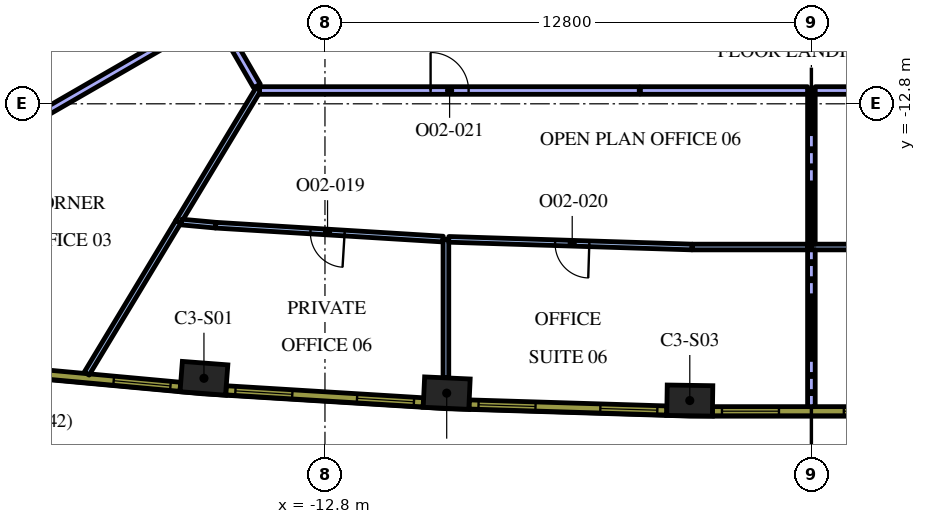
"""IFC4 building model, lengths in metres.
Left out: names, types, materials, properties, quantities, classifications, styles, units other than length and angle.
Written with IfcOpenShell. Run it as: python <this file> out.ifc"""

import sys

from ifc_helpers import new_model, si_unit, direction, frame, frame_2d, origin, origin_2d, place, context, subcontext, project, spatial, rectangle, extrude, element, fill, save


model = new_model("IFC4")
c1 = context("Model", 3, precision=1e-05, world=origin(), true_north=direction((0.0, 1.0)))
c2 = subcontext(c1, "Body", "Model", "MODEL_VIEW")
j1 = project(units=[si_unit("LENGTHUNIT", "METRE"), si_unit("PLANEANGLEUNIT", "RADIAN")], contexts=[c1])
p1 = place(None, origin())
s1 = spatial("IfcSite", under=j1, at=p1, CompositionType="ELEMENT")
p2 = place(p1, origin())
s2 = spatial("IfcBuilding", under=s1, at=p2, CompositionType="ELEMENT")
p3 = place(p2, frame((0.0, 0.0, 158.4)))
s3 = spatial("IfcBuildingStorey", under=s2, at=p3, CompositionType="ELEMENT", Elevation=158.4)
for number, where, z_axis, x_axis in (
    (1, (-15.985, -20.022, 0.0), (0.0, 0.0, 1.0), (0.997, -0.076, 0.0)),
    (2, (-9.597, -20.413, 0.0), (0.0, 0.0, 1.0), (0.999, -0.046, 0.0)),
    (3, (-3.2, -20.608, 0.0), (0.0, 0.0, 1.0), (1.0, -0.015, 0.0)),
):
    element("IfcColumn", number, at=place(p3, frame(where, z_axis=z_axis, x_axis=x_axis)), inside=s3, PredefinedType="COLUMN", context=c2, shape_type="SweptSolid", body=[
        extrude(rectangle(XDim=1.2, YDim=0.8, at=origin_2d()), origin(), (0.0, 0.0, 1.0), 4.2),
    ])
p4 = place(p3, frame((0.0, -16.568, 0.0), z_axis=(0.0, 0.0, 1.0), x_axis=(1.0, 0.0, 0.0)))
e4 = element("IfcWall", 4, at=p4, inside=s3, PredefinedType="PARTITIONING", context=c2, shape_type="SweptSolid", body=[
    extrude(rectangle(XDim=3.138, YDim=0.15, at=frame_2d((1.569, 0.0))), origin(), (0.0, 0.0, 1.0), 3.15),
])
p5 = place(p3, frame((0.0, -20.768, 0.0), z_axis=(0.0, 0.0, 1.0), x_axis=(0.0, 1.0, 0.0)))
e5 = element("IfcWall", 5, at=p5, inside=s3, PredefinedType="PARTITIONING", context=c2, shape_type="SweptSolid", body=[
    extrude(rectangle(XDim=4.125, YDim=0.2, at=frame_2d((2.062, 0.0))), origin(), (0.0, 0.0, 1.0), 3.15),
])
p6 = place(p3, frame((0.0, -16.493, 0.0), z_axis=(0.0, 0.0, 1.0), x_axis=(0.0, 1.0, 0.0)))
e6 = element("IfcWall", 6, at=p6, inside=s3, PredefinedType="PARTITIONING", context=c2, shape_type="SweptSolid", body=[
    extrude(rectangle(XDim=4.043, YDim=0.2, at=frame_2d((2.021, 0.0))), origin(), (0.0, 0.0, 1.0), 3.15),
])
p7 = place(p3, frame((0.1, -12.45, 0.0), z_axis=(0.0, 0.0, 1.0), x_axis=(1.0, 0.0, 0.0)))
e7 = element("IfcWall", 7, at=p7, inside=s3, PredefinedType="PARTITIONING", context=c2, shape_type="SweptSolid", body=[
    extrude(rectangle(XDim=4.4, YDim=0.2, at=frame_2d((2.2, 0.0))), origin(), (0.0, 0.0, 1.0), 3.15),
])
p8 = place(p3, frame((-16.656, -15.9, 0.0), z_axis=(0.0, 0.0, 1.0), x_axis=(-0.516845255261, -0.856078841062, 0.0)))
e8 = element("IfcWall", 8, at=p8, inside=s3, PredefinedType="PARTITIONING", context=c2, shape_type="SweptSolid", body=[
    extrude(rectangle(XDim=4.672, YDim=0.15, at=frame_2d((2.336, 0.0))), origin(), (0.0, 0.0, 1.0), 3.15),
])
p9 = place(p3, frame((-14.546, -12.406, 0.0), z_axis=(0.0, 0.0, 1.0), x_axis=(-0.516811321583, -0.856099327113, 0.0)))
e9 = element("IfcWall", 9, at=p9, inside=s3, PredefinedType="PARTITIONING", context=c2, shape_type="SweptSolid", body=[
    extrude(rectangle(XDim=4.09, YDim=0.15, at=frame_2d((2.045, 0.0))), origin(), (0.0, 0.0, 1.0), 3.15),
])
p10 = place(p3, frame((-20.851, -13.424, 0.0), z_axis=(0.0, 0.0, 1.0), x_axis=(0.866007151214, 0.500031613047, 0.0)))
e10 = element("IfcWall", 10, at=p10, inside=s3, PredefinedType="PARTITIONING", context=c2, shape_type="SweptSolid", body=[
    extrude(rectangle(XDim=5.97, YDim=0.2, at=frame_2d((2.985, 0.0))), origin(), (0.0, 0.0, 1.0), 3.15),
])
p11 = place(p3, frame((-15.666, -10.465, 0.0), z_axis=(0.0, 0.0, 1.0), x_axis=(0.499977443261, -0.866038426532, 0.0)))
e11 = element("IfcWall", 11, at=p11, inside=s3, PredefinedType="PARTITIONING", context=c2, shape_type="SweptSolid", body=[
    extrude(rectangle(XDim=2.155, YDim=0.2, at=frame_2d((1.077, 0.0))), origin(), (0.0, 0.0, 1.0), 3.15),
])
p12 = place(p3, frame((-9.617, -16.364, 0.0), z_axis=(0.0, 0.0, 1.0), x_axis=(0.0, -1.0, 0.0)))
e12 = element("IfcWall", 12, at=p12, inside=s3, PredefinedType="PARTITIONING", context=c2, shape_type="SweptSolid", body=[
    extrude(rectangle(XDim=3.647, YDim=0.15, at=frame_2d((1.824, 0.0))), origin(), (0.0, 0.0, 1.0), 3.15),
])
p13 = place(p3, frame((-16.575, -15.911, 0.0), z_axis=(0.0, 0.0, 1.0), x_axis=(0.995808489615, -0.09146284497, 0.0)))
e13 = element("IfcWall", 13, at=p13, inside=s3, PredefinedType="PARTITIONING", context=c2, shape_type="SweptSolid", body=[
    extrude(rectangle(XDim=0.902, YDim=0.15, at=frame_2d((0.451, 0.0))), origin(), (0.0, 0.0, 1.0), 3.15),
])
p14 = place(p3, frame((-9.692, -16.36, 0.0), z_axis=(0.0, 0.0, 1.0), x_axis=(-0.998135339661, 0.061039689709, 0.0)))
e14 = element("IfcWall", 14, at=p14, inside=s3, PredefinedType="PARTITIONING", context=c2, shape_type="SweptSolid", body=[
    extrude(rectangle(XDim=5.996, YDim=0.15, at=frame_2d((2.998, 0.0))), origin(), (0.0, 0.0, 1.0), 3.15),
])
p15 = place(p14, frame((2.595, 0.0, 0.0)))
e15 = element("IfcOpeningElement", 15, at=p15, cuts=e14, PredefinedType="OPENING", context=c2, shape_type="SweptSolid", body=[
    extrude(rectangle(XDim=0.9, YDim=2.1, at=frame_2d((0.45, 1.05))), frame((0.0, 0.085, 0.0), z_axis=(0.0, -1.0, 0.0), x_axis=(1.0, 0.0, 0.0)), (0.0, 0.0, 1.0), 0.17),
])
p16 = place(p3, frame((-3.138, -16.568, 0.0), z_axis=(0.0, 0.0, 1.0), x_axis=(-0.999504575396, 0.031473858384, 0.0)))
e16 = element("IfcWall", 16, at=p16, inside=s3, PredefinedType="PARTITIONING", context=c2, shape_type="SweptSolid", body=[
    extrude(rectangle(XDim=6.407, YDim=0.15, at=frame_2d((3.204, 0.0))), origin(), (0.0, 0.0, 1.0), 3.15),
])
p17 = place(p16, frame((2.707, 0.0, 0.0)))
e17 = element("IfcOpeningElement", 17, at=p17, cuts=e16, PredefinedType="OPENING", context=c2, shape_type="SweptSolid", body=[
    extrude(rectangle(XDim=0.9, YDim=2.1, at=frame_2d((0.45, 1.05))), frame((0.0, 0.085, 0.0), z_axis=(0.0, -1.0, 0.0), x_axis=(1.0, 0.0, 0.0)), (0.0, 0.0, 1.0), 0.17),
])
p18 = place(p3, frame((-3.138, -16.568, 0.0), z_axis=(0.0, 0.0, 1.0), x_axis=(1.0, 0.0, 0.0)))
e18 = element("IfcWall", 18, at=p18, inside=s3, PredefinedType="PARTITIONING", context=c2, shape_type="SweptSolid", body=[
    extrude(rectangle(XDim=3.038, YDim=0.15, at=frame_2d((1.519, 0.0))), origin(), (0.0, 0.0, 1.0), 3.15),
])
p19 = place(p3, frame((-4.5, -12.45, 0.0), z_axis=(0.0, 0.0, 1.0), x_axis=(1.0, 0.0, 0.0)))
e19 = element("IfcWall", 19, at=p19, inside=s3, PredefinedType="PARTITIONING", context=c2, shape_type="SweptSolid", body=[
    extrude(rectangle(XDim=4.4, YDim=0.2, at=frame_2d((2.2, 0.0))), origin(), (0.0, 0.0, 1.0), 3.15),
])
p20 = place(p3, frame((-14.521, -12.45, 0.0), z_axis=(0.0, 0.0, 1.0), x_axis=(1.0, 0.0, 0.0)))
e20 = element("IfcWall", 20, at=p20, inside=s3, PredefinedType="PARTITIONING", context=c2, shape_type="SweptSolid", body=[
    extrude(rectangle(XDim=9.99, YDim=0.2, at=frame_2d((4.995, 0.0))), origin(), (0.0, 0.0, 1.0), 3.15),
])
p21 = place(p20, frame((4.5, 0.0, 0.0)))
e21 = element("IfcOpeningElement", 21, at=p21, cuts=e20, PredefinedType="OPENING", context=c2, shape_type="SweptSolid", body=[
    extrude(rectangle(XDim=1.0, YDim=2.1, at=frame_2d((0.5, 1.05))), frame((0.0, 0.11, 0.0), z_axis=(0.0, -1.0, 0.0), x_axis=(1.0, 0.0, 0.0)), (0.0, 0.0, 1.0), 0.22),
])
p22 = place(p3, frame((-21.797, -19.77, 0.0), z_axis=(0.0, 0.0, 1.0), x_axis=(0.995808712151, -0.091460422067, 0.0)))
e22 = element("IfcWall", 22, at=p22, inside=s3, PredefinedType="SOLIDWALL", context=c2, shape_type="SweptSolid", body=[
    extrude(rectangle(XDim=5.213, YDim=0.24, at=frame_2d((2.606, 0.0))), origin(), (0.0, 0.0, 1.0), 3.95),
])
p23 = place(p22, frame((0.221, 0.0, 0.9)))
e23 = element("IfcOpeningElement", 23, at=p23, cuts=e22, PredefinedType="OPENING", context=c2, shape_type="SweptSolid", body=[
    extrude(rectangle(XDim=1.5, YDim=2.55, at=frame_2d((0.75, 1.275))), frame((0.0, 0.13, 0.0), z_axis=(0.0, -1.0, 0.0), x_axis=(1.0, 0.0, 0.0)), (0.0, 0.0, 1.0), 0.26),
])
p24 = place(p22, frame((3.452, 0.0, 0.9)))
e24 = element("IfcOpeningElement", 24, at=p24, cuts=e22, PredefinedType="OPENING", context=c2, shape_type="SweptSolid", body=[
    extrude(rectangle(XDim=1.5, YDim=2.55, at=frame_2d((0.75, 1.275))), frame((0.0, 0.13, 0.0), z_axis=(0.0, -1.0, 0.0), x_axis=(1.0, 0.0, 0.0)), (0.0, 0.0, 1.0), 0.26),
])
p25 = place(p3, frame((-15.405, -20.338, 0.0), z_axis=(0.0, 0.0, 1.0), x_axis=(0.998135294646, -0.061040425794, 0.0)))
e25 = element("IfcWall", 25, at=p25, inside=s3, PredefinedType="SOLIDWALL", context=c2, shape_type="SweptSolid", body=[
    extrude(rectangle(XDim=5.204, YDim=0.24, at=frame_2d((2.602, 0.0))), origin(), (0.0, 0.0, 1.0), 3.95),
])
p26 = place(p25, frame((0.248, 0.0, 0.9)))
e26 = element("IfcOpeningElement", 26, at=p26, cuts=e25, PredefinedType="OPENING", context=c2, shape_type="SweptSolid", body=[
    extrude(rectangle(XDim=1.5, YDim=2.55, at=frame_2d((0.75, 1.275))), frame((0.0, 0.13, 0.0), z_axis=(0.0, -1.0, 0.0), x_axis=(1.0, 0.0, 0.0)), (0.0, 0.0, 1.0), 0.26),
])
p27 = place(p25, frame((3.455, 0.0, 0.9)))
e27 = element("IfcOpeningElement", 27, at=p27, cuts=e25, PredefinedType="OPENING", context=c2, shape_type="SweptSolid", body=[
    extrude(rectangle(XDim=1.5, YDim=2.55, at=frame_2d((0.75, 1.275))), frame((0.0, 0.13, 0.0), z_axis=(0.0, -1.0, 0.0), x_axis=(1.0, 0.0, 0.0)), (0.0, 0.0, 1.0), 0.26),
])
p28 = place(p3, frame((-9.007, -20.711, 0.0), z_axis=(0.0, 0.0, 1.0), x_axis=(0.999533441983, -0.030543384845, 0.0)))
e28 = element("IfcWall", 28, at=p28, inside=s3, PredefinedType="SOLIDWALL", context=c2, shape_type="SweptSolid", body=[
    extrude(rectangle(XDim=5.204, YDim=0.24, at=frame_2d((2.602, 0.0))), origin(), (0.0, 0.0, 1.0), 3.95),
])
p29 = place(p28, frame((0.248, 0.0, 0.9)))
e29 = element("IfcOpeningElement", 29, at=p29, cuts=e28, PredefinedType="OPENING", context=c2, shape_type="SweptSolid", body=[
    extrude(rectangle(XDim=1.5, YDim=2.55, at=frame_2d((0.75, 1.275))), frame((0.0, 0.13, 0.0), z_axis=(0.0, -1.0, 0.0), x_axis=(1.0, 0.0, 0.0)), (0.0, 0.0, 1.0), 0.26),
])
p30 = place(p28, frame((3.455, 0.0, 0.9)))
e30 = element("IfcOpeningElement", 30, at=p30, cuts=e28, PredefinedType="OPENING", context=c2, shape_type="SweptSolid", body=[
    extrude(rectangle(XDim=1.5, YDim=2.55, at=frame_2d((0.75, 1.275))), frame((0.0, 0.13, 0.0), z_axis=(0.0, -1.0, 0.0), x_axis=(1.0, 0.0, 0.0)), (0.0, 0.0, 1.0), 0.26),
])
p31 = place(p3, frame((-2.602, -20.888, 0.0), z_axis=(0.0, 0.0, 1.0), x_axis=(1.0, 0.0, 0.0)))
e31 = element("IfcWall", 31, at=p31, inside=s3, PredefinedType="SOLIDWALL", context=c2, shape_type="SweptSolid", body=[
    extrude(rectangle(XDim=5.204, YDim=0.24, at=frame_2d((2.602, 0.0))), origin(), (0.0, 0.0, 1.0), 3.95),
])
p32 = place(p31, frame((0.248, 0.0, 0.9)))
e32 = element("IfcOpeningElement", 32, at=p32, cuts=e31, PredefinedType="OPENING", context=c2, shape_type="SweptSolid", body=[
    extrude(rectangle(XDim=1.5, YDim=2.55, at=frame_2d((0.75, 1.275))), frame((0.0, 0.13, 0.0), z_axis=(0.0, -1.0, 0.0), x_axis=(1.0, 0.0, 0.0)), (0.0, 0.0, 1.0), 0.26),
])
p33 = place(p31, frame((3.455, 0.0, 0.9)))
e33 = element("IfcOpeningElement", 33, at=p33, cuts=e31, PredefinedType="OPENING", context=c2, shape_type="SweptSolid", body=[
    extrude(rectangle(XDim=1.5, YDim=2.55, at=frame_2d((0.75, 1.275))), frame((0.0, 0.13, 0.0), z_axis=(0.0, -1.0, 0.0), x_axis=(1.0, 0.0, 0.0)), (0.0, 0.0, 1.0), 0.26),
])
p34 = place(p15, origin())
e34 = element("IfcDoor", 34, at=p34, inside=s3, OperationType="SINGLE_SWING_RIGHT", PredefinedType="DOOR", context=c2, shape_type="SweptSolid", body=[
    extrude(rectangle(XDim=0.9, YDim=2.1, at=frame_2d((0.45, 1.05))), frame((0.0, 0.025, 0.0), z_axis=(0.0, -1.0, 0.0), x_axis=(1.0, 0.0, 0.0)), (0.0, 0.0, 1.0), 0.05),
])
fill(e15, e34)
p35 = place(p17, origin())
e35 = element("IfcDoor", 35, at=p35, inside=s3, OperationType="SINGLE_SWING_LEFT", PredefinedType="DOOR", context=c2, shape_type="SweptSolid", body=[
    extrude(rectangle(XDim=0.9, YDim=2.1, at=frame_2d((0.45, 1.05))), frame((0.0, 0.025, 0.0), z_axis=(0.0, -1.0, 0.0), x_axis=(1.0, 0.0, 0.0)), (0.0, 0.0, 1.0), 0.05),
])
fill(e17, e35)
p36 = place(p21, origin())
e36 = element("IfcDoor", 36, at=p36, inside=s3, OperationType="SINGLE_SWING_RIGHT", PredefinedType="DOOR", context=c2, shape_type="SweptSolid", body=[
    extrude(rectangle(XDim=1.0, YDim=2.1, at=frame_2d((0.5, 1.05))), frame((0.0, 0.025, 0.0), z_axis=(0.0, -1.0, 0.0), x_axis=(1.0, 0.0, 0.0)), (0.0, 0.0, 1.0), 0.05),
])
fill(e21, e36)
p37 = place(p24, origin())
e37 = element("IfcWindow", 37, at=p37, inside=s3, PartitioningType="SINGLE_PANEL", PredefinedType="WINDOW", context=c2, shape_type="SweptSolid", body=[
    extrude(rectangle(XDim=1.5, YDim=2.55, at=frame_2d((0.75, 1.275))), frame((0.0, 0.04, 0.0), z_axis=(0.0, -1.0, 0.0), x_axis=(1.0, 0.0, 0.0)), (0.0, 0.0, 1.0), 0.06),
])
fill(e24, e37)
p38 = place(p26, origin())
e38 = element("IfcWindow", 38, at=p38, inside=s3, PartitioningType="SINGLE_PANEL", PredefinedType="WINDOW", context=c2, shape_type="SweptSolid", body=[
    extrude(rectangle(XDim=1.5, YDim=2.55, at=frame_2d((0.75, 1.275))), frame((0.0, 0.04, 0.0), z_axis=(0.0, -1.0, 0.0), x_axis=(1.0, 0.0, 0.0)), (0.0, 0.0, 1.0), 0.06),
])
fill(e26, e38)
p39 = place(p27, origin())
e39 = element("IfcWindow", 39, at=p39, inside=s3, PartitioningType="SINGLE_PANEL", PredefinedType="WINDOW", context=c2, shape_type="SweptSolid", body=[
    extrude(rectangle(XDim=1.5, YDim=2.55, at=frame_2d((0.75, 1.275))), frame((0.0, 0.04, 0.0), z_axis=(0.0, -1.0, 0.0), x_axis=(1.0, 0.0, 0.0)), (0.0, 0.0, 1.0), 0.06),
])
fill(e27, e39)
p40 = place(p29, origin())
e40 = element("IfcWindow", 40, at=p40, inside=s3, PartitioningType="SINGLE_PANEL", PredefinedType="WINDOW", context=c2, shape_type="SweptSolid", body=[
    extrude(rectangle(XDim=1.5, YDim=2.55, at=frame_2d((0.75, 1.275))), frame((0.0, 0.04, 0.0), z_axis=(0.0, -1.0, 0.0), x_axis=(1.0, 0.0, 0.0)), (0.0, 0.0, 1.0), 0.06),
])
fill(e29, e40)
p41 = place(p30, origin())
e41 = element("IfcWindow", 41, at=p41, inside=s3, PartitioningType="SINGLE_PANEL", PredefinedType="WINDOW", context=c2, shape_type="SweptSolid", body=[
    extrude(rectangle(XDim=1.5, YDim=2.55, at=frame_2d((0.75, 1.275))), frame((0.0, 0.04, 0.0), z_axis=(0.0, -1.0, 0.0), x_axis=(1.0, 0.0, 0.0)), (0.0, 0.0, 1.0), 0.06),
])
fill(e30, e41)
p42 = place(p32, origin())
e42 = element("IfcWindow", 42, at=p42, inside=s3, PartitioningType="SINGLE_PANEL", PredefinedType="WINDOW", context=c2, shape_type="SweptSolid", body=[
    extrude(rectangle(XDim=1.5, YDim=2.55, at=frame_2d((0.75, 1.275))), frame((0.0, 0.04, 0.0), z_axis=(0.0, -1.0, 0.0), x_axis=(1.0, 0.0, 0.0)), (0.0, 0.0, 1.0), 0.06),
])
fill(e32, e42)
p43 = place(p33, origin())
e43 = element("IfcWindow", 43, at=p43, inside=s3, PartitioningType="SINGLE_PANEL", PredefinedType="WINDOW", context=c2, shape_type="SweptSolid", body=[
    extrude(rectangle(XDim=1.5, YDim=2.55, at=frame_2d((0.75, 1.275))), frame((0.0, 0.04, 0.0), z_axis=(0.0, -1.0, 0.0), x_axis=(1.0, 0.0, 0.0)), (0.0, 0.0, 1.0), 0.06),
])
fill(e33, e43)
save(model, sys.argv[1])
